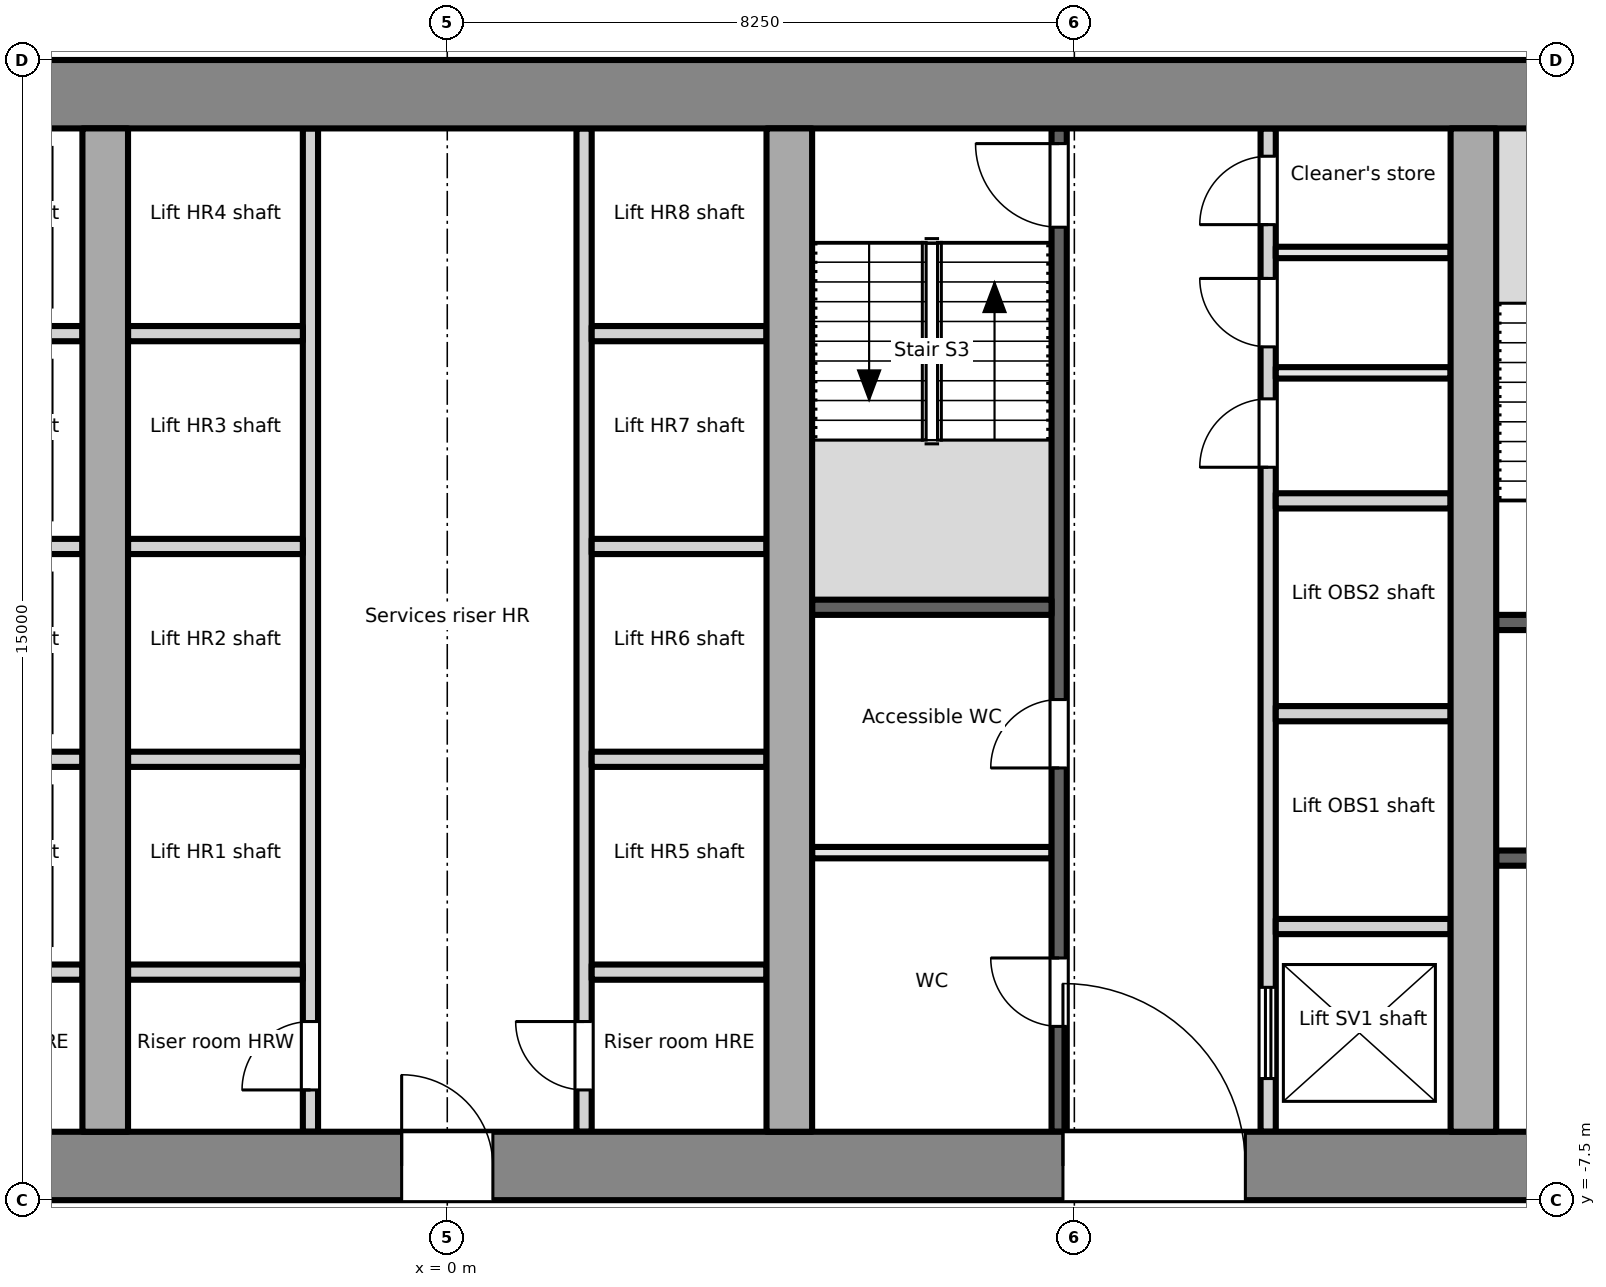
"""IFC4 building model, lengths in metres.
Left out: names, types, materials, properties, quantities, classifications, styles, units other than length and angle.
Written with IfcOpenShell. Run it as: python <this file> out.ifc"""

import sys

from ifc_helpers import new_model, si_unit, direction, frame, frame_2d, origin, place, context, subcontext, project, spatial, rectangle, extrude, element, fill, save


model = new_model("IFC4")
c1 = context("Model", 3, precision=1e-05, world=origin(), true_north=direction((0.0, 1.0)))
c2 = subcontext(c1, "Body", "Model", "MODEL_VIEW")
j1 = project(units=[si_unit("LENGTHUNIT", "METRE"), si_unit("PLANEANGLEUNIT", "RADIAN")], contexts=[c1])
p1 = place(None, origin())
s1 = spatial("IfcSite", under=j1, at=p1, CompositionType="ELEMENT")
p2 = place(p1, origin())
s2 = spatial("IfcBuilding", under=s1, at=p2, CompositionType="ELEMENT")
p3 = place(p2, frame((0.0, 0.0, 150.1)))
s3 = spatial("IfcBuildingStorey", under=s2, at=p3, CompositionType="ELEMENT", Elevation=150.1)
p4 = place(p3, frame((-18.0, -7.05, -0.2), z_axis=(0.0, 0.0, 1.0), x_axis=(1.0, 0.0, 0.0)))
e1 = element("IfcWall", 1, at=p4, inside=s3, PredefinedType="SHEAR", context=c2, shape_type="SweptSolid", body=[
    extrude(rectangle(XDim=36.0, YDim=0.9, at=frame_2d((18.0, 0.0))), origin(), (0.0, 0.0, 1.0), 4.0),
])
p5 = place(p4, frame((7.8, 0.0, 0.2)))
e2 = element("IfcOpeningElement", 2, at=p5, cuts=e1, PredefinedType="OPENING", context=c2, shape_type="SweptSolid", body=[
    extrude(rectangle(XDim=2.4, YDim=2.1, at=frame_2d((1.2, 1.05))), frame((0.0, 0.46, 0.0), z_axis=(0.0, -1.0, 0.0), x_axis=(1.0, 0.0, 0.0)), (0.0, 0.0, 1.0), 0.921),
])
p6 = place(p4, frame((17.4, 0.0, 0.2)))
e3 = element("IfcOpeningElement", 3, at=p6, cuts=e1, PredefinedType="OPENING", context=c2, shape_type="SweptSolid", body=[
    extrude(rectangle(XDim=1.2, YDim=2.1, at=frame_2d((0.6, 1.05))), frame((0.0, 0.46, 0.0), z_axis=(0.0, -1.0, 0.0), x_axis=(1.0, 0.0, 0.0)), (0.0, 0.0, 1.0), 0.921),
])
p7 = place(p4, frame((26.1, 0.0, 0.2)))
e4 = element("IfcOpeningElement", 4, at=p7, cuts=e1, PredefinedType="OPENING", context=c2, shape_type="SweptSolid", body=[
    extrude(rectangle(XDim=2.4, YDim=2.1, at=frame_2d((1.2, 1.05))), frame((0.0, 0.46, 0.0), z_axis=(0.0, -1.0, 0.0), x_axis=(1.0, 0.0, 0.0)), (0.0, 0.0, 1.0), 0.921),
])
p8 = place(p3, frame((-18.0, 7.05, -0.2), z_axis=(0.0, 0.0, 1.0), x_axis=(1.0, 0.0, 0.0)))
e5 = element("IfcWall", 5, at=p8, inside=s3, PredefinedType="SHEAR", context=c2, shape_type="SweptSolid", body=[
    extrude(rectangle(XDim=36.0, YDim=0.9, at=frame_2d((18.0, 0.0))), origin(), (0.0, 0.0, 1.0), 4.0),
])
for number, where, z_axis, x_axis in (
    (6, (-4.5, -6.6, -0.2), (0.0, 0.0, 1.0), (0.0, 1.0, 0.0)),
    (7, (4.5, -6.6, -0.2), (0.0, 0.0, 1.0), (0.0, 1.0, 0.0)),
    (8, (13.5, -6.6, -0.2), (0.0, 0.0, 1.0), (0.0, 1.0, 0.0)),
):
    element("IfcWall", number, at=place(p3, frame(where, z_axis=z_axis, x_axis=x_axis)), inside=s3, PredefinedType="SHEAR", context=c2, shape_type="SweptSolid", body=[
        extrude(rectangle(XDim=13.2, YDim=0.6, at=frame_2d((6.6, 0.0))), origin(), (0.0, 0.0, 1.0), 4.0),
    ])
p9 = place(p3, frame((13.8, -3.0, 0.0), z_axis=(0.0, 0.0, 1.0), x_axis=(1.0, 0.0, 0.0)))
e9 = element("IfcWall", 9, at=p9, inside=s3, PredefinedType="PARTITIONING", context=c2, shape_type="SweptSolid", body=[
    extrude(rectangle(XDim=3.3, YDim=0.2, at=frame_2d((1.65, 0.0))), origin(), (0.0, 0.0, 1.0), 3.8),
])
p10 = place(p9, frame((1.1, 0.0, 0.0)))
e10 = element("IfcOpeningElement", 10, at=p10, cuts=e9, PredefinedType="OPENING", context=c2, shape_type="SweptSolid", body=[
    extrude(rectangle(XDim=1.1, YDim=2.1, at=frame_2d((0.55, 1.05))), frame((0.0, 0.111, 0.0), z_axis=(0.0, -1.0, 0.0), x_axis=(1.0, 0.0, 0.0)), (0.0, 0.0, 1.0), 0.221),
])
p11 = place(p3, frame((13.8, 0.1, 0.0), z_axis=(0.0, 0.0, 1.0), x_axis=(1.0, 0.0, 0.0)))
e11 = element("IfcWall", 11, at=p11, inside=s3, PredefinedType="PARTITIONING", context=c2, shape_type="SweptSolid", body=[
    extrude(rectangle(XDim=3.3, YDim=0.2, at=frame_2d((1.65, 0.0))), origin(), (0.0, 0.0, 1.0), 3.8),
])
p12 = place(p11, frame((1.1, 0.0, 0.0)))
e12 = element("IfcOpeningElement", 12, at=p12, cuts=e11, PredefinedType="OPENING", context=c2, shape_type="SweptSolid", body=[
    extrude(rectangle(XDim=1.1, YDim=2.1, at=frame_2d((0.55, 1.05))), frame((0.0, 0.111, 0.0), z_axis=(0.0, -1.0, 0.0), x_axis=(1.0, 0.0, 0.0)), (0.0, 0.0, 1.0), 0.221),
])
for number, where, z_axis, x_axis in (
    (13, (-7.1, -1.7, 0.0), (0.0, 0.0, 1.0), (1.0, 0.0, 0.0)),
    (14, (-7.1, 1.1, 0.0), (0.0, 0.0, 1.0), (1.0, 0.0, 0.0)),
    (15, (-7.1, 3.9, 0.0), (0.0, 0.0, 1.0), (1.0, 0.0, 0.0)),
    (16, (-7.1, -4.5, 0.0), (0.0, 0.0, 1.0), (1.0, 0.0, 0.0)),
):
    element("IfcWall", number, at=place(p3, frame(where, z_axis=z_axis, x_axis=x_axis)), inside=s3, PredefinedType="PARTITIONING", context=c2, shape_type="SweptSolid", body=[
        extrude(rectangle(XDim=2.3, YDim=0.2, at=frame_2d((1.15, 0.0))), origin(), (0.0, 0.0, 1.0), 3.8),
    ])
p13 = place(p3, frame((-1.8, -6.6, 0.0), z_axis=(0.0, 0.0, 1.0), x_axis=(0.0, 1.0, 0.0)))
e17 = element("IfcWall", 17, at=p13, inside=s3, PredefinedType="PARTITIONING", context=c2, shape_type="SweptSolid", body=[
    extrude(rectangle(XDim=13.2, YDim=0.2, at=frame_2d((6.6, 0.0))), origin(), (0.0, 0.0, 1.0), 3.8),
])
p14 = place(p13, frame((0.55, 0.0, 0.0)))
e18 = element("IfcOpeningElement", 18, at=p14, cuts=e17, PredefinedType="OPENING", context=c2, shape_type="SweptSolid", body=[
    extrude(rectangle(XDim=0.9, YDim=2.1, at=frame_2d((0.45, 1.05))), frame((0.0, 0.111, 0.0), z_axis=(0.0, -1.0, 0.0), x_axis=(1.0, 0.0, 0.0)), (0.0, 0.0, 1.0), 0.221),
])
p15 = place(p3, frame((1.8, -6.6, 0.0), z_axis=(0.0, 0.0, 1.0), x_axis=(0.0, 1.0, 0.0)))
e19 = element("IfcWall", 19, at=p15, inside=s3, PredefinedType="PARTITIONING", context=c2, shape_type="SweptSolid", body=[
    extrude(rectangle(XDim=13.2, YDim=0.2, at=frame_2d((6.6, 0.0))), origin(), (0.0, 0.0, 1.0), 3.8),
])
p16 = place(p15, frame((0.55, 0.0, 0.0)))
e20 = element("IfcOpeningElement", 20, at=p16, cuts=e19, PredefinedType="OPENING", context=c2, shape_type="SweptSolid", body=[
    extrude(rectangle(XDim=0.9, YDim=2.1, at=frame_2d((0.45, 1.05))), frame((0.0, 0.111, 0.0), z_axis=(0.0, -1.0, 0.0), x_axis=(1.0, 0.0, 0.0)), (0.0, 0.0, 1.0), 0.221),
])
for number, where, z_axis, x_axis in (
    (21, (-4.2, -1.7, 0.0), (0.0, 0.0, 1.0), (1.0, 0.0, 0.0)),
    (22, (-4.2, 1.1, 0.0), (0.0, 0.0, 1.0), (1.0, 0.0, 0.0)),
    (23, (-4.2, 3.9, 0.0), (0.0, 0.0, 1.0), (1.0, 0.0, 0.0)),
    (24, (-4.2, -4.5, 0.0), (0.0, 0.0, 1.0), (1.0, 0.0, 0.0)),
    (25, (1.9, -1.7, 0.0), (0.0, 0.0, 1.0), (1.0, 0.0, 0.0)),
    (26, (1.9, 1.1, 0.0), (0.0, 0.0, 1.0), (1.0, 0.0, 0.0)),
    (27, (1.9, 3.9, 0.0), (0.0, 0.0, 1.0), (1.0, 0.0, 0.0)),
    (28, (1.9, -4.5, 0.0), (0.0, 0.0, 1.0), (1.0, 0.0, 0.0)),
):
    element("IfcWall", number, at=place(p3, frame(where, z_axis=z_axis, x_axis=x_axis)), inside=s3, PredefinedType="PARTITIONING", context=c2, shape_type="SweptSolid", body=[
        extrude(rectangle(XDim=2.3, YDim=0.2, at=frame_2d((1.15, 0.0))), origin(), (0.0, 0.0, 1.0), 3.8),
    ])
p17 = place(p3, frame((8.05, -6.6, 0.0), z_axis=(0.0, 0.0, 1.0), x_axis=(0.0, 1.0, 0.0)))
e29 = element("IfcWall", 29, at=p17, inside=s3, PredefinedType="PARTITIONING", context=c2, shape_type="SweptSolid", body=[
    extrude(rectangle(XDim=13.2, YDim=0.2, at=frame_2d((6.6, 0.0))), origin(), (0.0, 0.0, 1.0), 3.8),
])
p18 = place(p17, frame((1.386, 0.0, 0.0)))
e30 = element("IfcOpeningElement", 30, at=p18, cuts=e29, PredefinedType="OPENING", context=c2, shape_type="SweptSolid", body=[
    extrude(rectangle(XDim=0.9, YDim=2.1, at=frame_2d((0.45, 1.05))), frame((0.0, 0.111, 0.0), z_axis=(0.0, -1.0, 0.0), x_axis=(1.0, 0.0, 0.0)), (0.0, 0.0, 1.0), 0.221),
])
p19 = place(p17, frame((4.786, 0.0, 0.0)))
e31 = element("IfcOpeningElement", 31, at=p19, cuts=e29, PredefinedType="OPENING", context=c2, shape_type="SweptSolid", body=[
    extrude(rectangle(XDim=0.9, YDim=2.1, at=frame_2d((0.45, 1.05))), frame((0.0, 0.111, 0.0), z_axis=(0.0, -1.0, 0.0), x_axis=(1.0, 0.0, 0.0)), (0.0, 0.0, 1.0), 0.221),
])
p20 = place(p17, frame((11.9, 0.0, 0.0)))
e32 = element("IfcOpeningElement", 32, at=p20, cuts=e29, PredefinedType="OPENING", context=c2, shape_type="SweptSolid", body=[
    extrude(rectangle(XDim=1.1, YDim=2.1, at=frame_2d((0.55, 1.05))), frame((0.0, 0.111, 0.0), z_axis=(0.0, -1.0, 0.0), x_axis=(1.0, 0.0, 0.0)), (0.0, 0.0, 1.0), 0.221),
])
p21 = place(p3, frame((10.8, -6.6, 0.0), z_axis=(0.0, 0.0, 1.0), x_axis=(0.0, 1.0, 0.0)))
e33 = element("IfcWall", 33, at=p21, inside=s3, PredefinedType="PARTITIONING", context=c2, shape_type="SweptSolid", body=[
    extrude(rectangle(XDim=13.2, YDim=0.2, at=frame_2d((6.6, 0.0))), origin(), (0.0, 0.0, 1.0), 3.8),
])
p22 = place(p21, frame((0.7, 0.0, 0.0)))
e34 = element("IfcOpeningElement", 34, at=p22, cuts=e33, PredefinedType="OPENING", context=c2, shape_type="SweptSolid", body=[
    extrude(rectangle(XDim=1.2, YDim=2.1, at=frame_2d((0.6, 1.05))), frame((0.0, 0.111, 0.0), z_axis=(0.0, -1.0, 0.0), x_axis=(1.0, 0.0, 0.0)), (0.0, 0.0, 1.0), 0.221),
])
p23 = place(p21, frame((8.742, 0.0, 0.0)))
e35 = element("IfcOpeningElement", 35, at=p23, cuts=e33, PredefinedType="OPENING", context=c2, shape_type="SweptSolid", body=[
    extrude(rectangle(XDim=0.9, YDim=2.1, at=frame_2d((0.45, 1.05))), frame((0.0, 0.111, 0.0), z_axis=(0.0, -1.0, 0.0), x_axis=(1.0, 0.0, 0.0)), (0.0, 0.0, 1.0), 0.221),
])
p24 = place(p21, frame((10.326, 0.0, 0.0)))
e36 = element("IfcOpeningElement", 36, at=p24, cuts=e33, PredefinedType="OPENING", context=c2, shape_type="SweptSolid", body=[
    extrude(rectangle(XDim=0.9, YDim=2.1, at=frame_2d((0.45, 1.05))), frame((0.0, 0.111, 0.0), z_axis=(0.0, -1.0, 0.0), x_axis=(1.0, 0.0, 0.0)), (0.0, 0.0, 1.0), 0.221),
])
p25 = place(p21, frame((11.934, 0.0, 0.0)))
e37 = element("IfcOpeningElement", 37, at=p25, cuts=e33, PredefinedType="OPENING", context=c2, shape_type="SweptSolid", body=[
    extrude(rectangle(XDim=0.9, YDim=2.1, at=frame_2d((0.45, 1.05))), frame((0.0, 0.111, 0.0), z_axis=(0.0, -1.0, 0.0), x_axis=(1.0, 0.0, 0.0)), (0.0, 0.0, 1.0), 0.221),
])
p26 = place(p3, frame((4.8, 0.3, 0.0), z_axis=(0.0, 0.0, 1.0), x_axis=(1.0, 0.0, 0.0)))
e38 = element("IfcWall", 38, at=p26, inside=s3, PredefinedType="PARTITIONING", context=c2, shape_type="SweptSolid", body=[
    extrude(rectangle(XDim=3.15, YDim=0.2, at=frame_2d((1.575, 0.0))), origin(), (0.0, 0.0, 1.0), 3.8),
])
p27 = place(p3, frame((4.8, -2.928, 0.0), z_axis=(0.0, 0.0, 1.0), x_axis=(1.0, 0.0, 0.0)))
e39 = element("IfcWall", 39, at=p27, inside=s3, PredefinedType="PARTITIONING", context=c2, shape_type="SweptSolid", body=[
    extrude(rectangle(XDim=3.15, YDim=0.15, at=frame_2d((1.575, 0.0))), origin(), (0.0, 0.0, 1.0), 3.8),
])
for number, where, z_axis, x_axis in (
    (40, (10.9, -3.9, 0.0), (0.0, 0.0, 1.0), (1.0, 0.0, 0.0)),
    (41, (10.9, -1.1, 0.0), (0.0, 0.0, 1.0), (1.0, 0.0, 0.0)),
    (42, (10.9, 1.7, 0.0), (0.0, 0.0, 1.0), (1.0, 0.0, 0.0)),
):
    element("IfcWall", number, at=place(p3, frame(where, z_axis=z_axis, x_axis=x_axis)), inside=s3, PredefinedType="PARTITIONING", context=c2, shape_type="SweptSolid", body=[
        extrude(rectangle(XDim=2.3, YDim=0.2, at=frame_2d((1.15, 0.0))), origin(), (0.0, 0.0, 1.0), 3.8),
    ])
for number, where, z_axis, x_axis in (
    (43, (10.9, 3.384, 0.0), (0.0, 0.0, 1.0), (1.0, 0.0, 0.0)),
    (44, (10.9, 4.968, 0.0), (0.0, 0.0, 1.0), (1.0, 0.0, 0.0)),
):
    element("IfcWall", number, at=place(p3, frame(where, z_axis=z_axis, x_axis=x_axis)), inside=s3, PredefinedType="PARTITIONING", context=c2, shape_type="SweptSolid", body=[
        extrude(rectangle(XDim=2.3, YDim=0.15, at=frame_2d((1.15, 0.0))), origin(), (0.0, 0.0, 1.0), 3.8),
    ])
p28 = place(p14, origin())
e45 = element("IfcDoor", 45, at=p28, inside=s3, OperationType="SINGLE_SWING_LEFT", PredefinedType="DOOR", context=c2, shape_type="SweptSolid", body=[
    extrude(rectangle(XDim=0.9, YDim=2.1, at=frame_2d((0.45, 1.05))), frame((0.0, 0.025, 0.0), z_axis=(0.0, -1.0, 0.0), x_axis=(1.0, 0.0, 0.0)), (0.0, 0.0, 1.0), 0.05),
])
fill(e18, e45)
p29 = place(p16, origin())
e46 = element("IfcDoor", 46, at=p29, inside=s3, OperationType="SINGLE_SWING_RIGHT", PredefinedType="DOOR", context=c2, shape_type="SweptSolid", body=[
    extrude(rectangle(XDim=0.9, YDim=2.1, at=frame_2d((0.45, 1.05))), frame((0.0, 0.025, 0.0), z_axis=(0.0, -1.0, 0.0), x_axis=(1.0, 0.0, 0.0)), (0.0, 0.0, 1.0), 0.05),
])
fill(e20, e46)
p30 = place(p6, origin())
e47 = element("IfcDoor", 47, at=p30, inside=s3, OperationType="SINGLE_SWING_LEFT", PredefinedType="DOOR", context=c2, shape_type="SweptSolid", body=[
    extrude(rectangle(XDim=1.2, YDim=2.1, at=frame_2d((0.6, 1.05))), frame((0.0, 0.025, 0.0), z_axis=(0.0, -1.0, 0.0), x_axis=(1.0, 0.0, 0.0)), (0.0, 0.0, 1.0), 0.05),
])
fill(e3, e47)
p31 = place(p18, origin())
e48 = element("IfcDoor", 48, at=p31, inside=s3, OperationType="SINGLE_SWING_RIGHT", PredefinedType="DOOR", context=c2, shape_type="SweptSolid", body=[
    extrude(rectangle(XDim=0.9, YDim=2.1, at=frame_2d((0.45, 1.05))), frame((0.0, 0.025, 0.0), z_axis=(0.0, -1.0, 0.0), x_axis=(1.0, 0.0, 0.0)), (0.0, 0.0, 1.0), 0.05),
])
fill(e30, e48)
p32 = place(p19, origin())
e49 = element("IfcDoor", 49, at=p32, inside=s3, OperationType="SINGLE_SWING_LEFT", PredefinedType="DOOR", context=c2, shape_type="SweptSolid", body=[
    extrude(rectangle(XDim=0.9, YDim=2.1, at=frame_2d((0.45, 1.05))), frame((0.0, 0.025, 0.0), z_axis=(0.0, -1.0, 0.0), x_axis=(1.0, 0.0, 0.0)), (0.0, 0.0, 1.0), 0.05),
])
fill(e31, e49)
p33 = place(p20, origin())
e50 = element("IfcDoor", 50, at=p33, inside=s3, OperationType="SINGLE_SWING_RIGHT", PredefinedType="DOOR", context=c2, shape_type="SweptSolid", body=[
    extrude(rectangle(XDim=1.1, YDim=2.1, at=frame_2d((0.55, 1.05))), frame((0.0, 0.025, 0.0), z_axis=(0.0, -1.0, 0.0), x_axis=(1.0, 0.0, 0.0)), (0.0, 0.0, 1.0), 0.05),
])
fill(e32, e50)
p34 = place(p7, origin())
e51 = element("IfcDoor", 51, at=p34, inside=s3, OperationType="DOUBLE_DOOR_DOUBLE_SWING", PredefinedType="DOOR", context=c2, shape_type="SweptSolid", body=[
    extrude(rectangle(XDim=2.4, YDim=2.1, at=frame_2d((1.2, 1.05))), frame((0.0, 0.025, 0.0), z_axis=(0.0, -1.0, 0.0), x_axis=(1.0, 0.0, 0.0)), (0.0, 0.0, 1.0), 0.05),
])
fill(e4, e51)
p35 = place(p22, origin())
e52 = element("IfcDoor", 52, at=p35, inside=s3, OperationType="DOUBLE_DOOR_SLIDING", PredefinedType="DOOR", context=c2, shape_type="SweptSolid", body=[
    extrude(rectangle(XDim=1.2, YDim=2.1, at=frame_2d((0.6, 1.05))), frame((0.0, 0.025, 0.0), z_axis=(0.0, -1.0, 0.0), x_axis=(1.0, 0.0, 0.0)), (0.0, 0.0, 1.0), 0.05),
])
fill(e34, e52)
p36 = place(p23, origin())
e53 = element("IfcDoor", 53, at=p36, inside=s3, OperationType="SINGLE_SWING_LEFT", PredefinedType="DOOR", context=c2, shape_type="SweptSolid", body=[
    extrude(rectangle(XDim=0.9, YDim=2.1, at=frame_2d((0.45, 1.05))), frame((0.0, 0.025, 0.0), z_axis=(0.0, -1.0, 0.0), x_axis=(1.0, 0.0, 0.0)), (0.0, 0.0, 1.0), 0.05),
])
fill(e35, e53)
p37 = place(p24, origin())
e54 = element("IfcDoor", 54, at=p37, inside=s3, OperationType="SINGLE_SWING_RIGHT", PredefinedType="DOOR", context=c2, shape_type="SweptSolid", body=[
    extrude(rectangle(XDim=0.9, YDim=2.1, at=frame_2d((0.45, 1.05))), frame((0.0, 0.025, 0.0), z_axis=(0.0, -1.0, 0.0), x_axis=(1.0, 0.0, 0.0)), (0.0, 0.0, 1.0), 0.05),
])
fill(e36, e54)
p38 = place(p25, origin())
e55 = element("IfcDoor", 55, at=p38, inside=s3, OperationType="SINGLE_SWING_LEFT", PredefinedType="DOOR", context=c2, shape_type="SweptSolid", body=[
    extrude(rectangle(XDim=0.9, YDim=2.1, at=frame_2d((0.45, 1.05))), frame((0.0, 0.025, 0.0), z_axis=(0.0, -1.0, 0.0), x_axis=(1.0, 0.0, 0.0)), (0.0, 0.0, 1.0), 0.05),
])
fill(e37, e55)
save(model, sys.argv[1])
